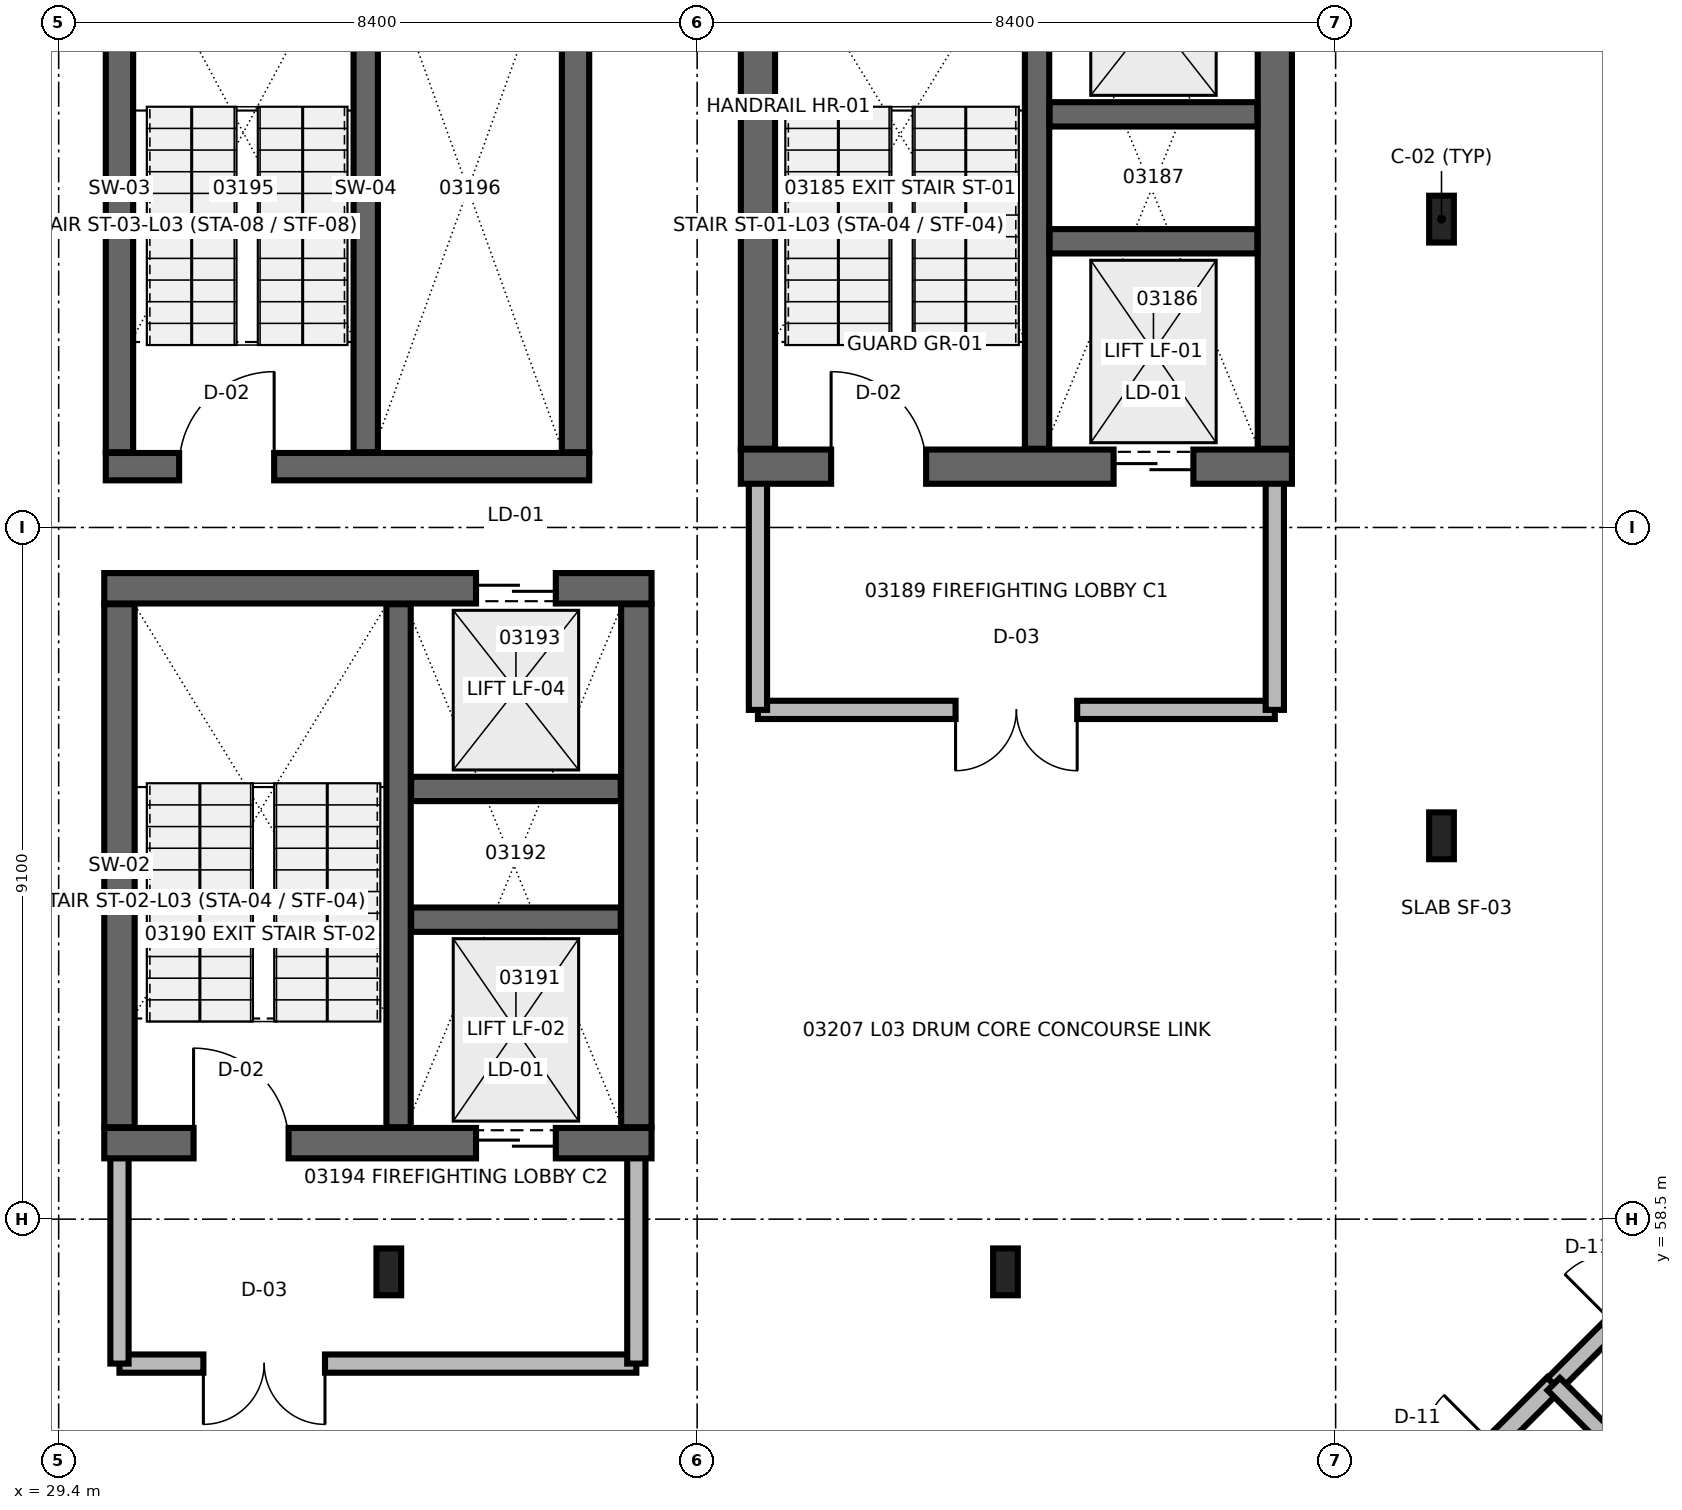
"""IFC4 building model, lengths in metres.
Left out: names, types, materials, properties, quantities, classifications, styles, units other than length and angle.
Written with IfcOpenShell. Run it as: python <this file> out.ifc"""

import sys

from ifc_helpers import new_model, si_unit, direction, frame, frame_2d, origin, origin_2d, place, context, subcontext, project, spatial, rectangle, i_section, extrude, element, fill, save


model = new_model("IFC4")
c1 = context("Model", 3, precision=1e-05, world=origin(), true_north=direction((0.0, 1.0)))
c2 = subcontext(c1, "Body", "Model", "MODEL_VIEW")
j1 = project(units=[si_unit("LENGTHUNIT", "METRE"), si_unit("PLANEANGLEUNIT", "RADIAN")], contexts=[c1])
p1 = place(None, origin())
s1 = spatial("IfcSite", under=j1, at=p1, CompositionType="ELEMENT")
p2 = place(p1, origin())
s2 = spatial("IfcBuilding", under=s1, at=p2, CompositionType="ELEMENT")
p3 = place(p2, frame((0.0, 0.0, 13.8)))
s3 = spatial("IfcBuildingStorey", under=s2, at=p3, CompositionType="ELEMENT", Elevation=13.8)
for number, where, z_axis, x_axis in (
    (1, (47.593, 71.656, 0.0), (0.0, 0.0, 1.0), (1.0, 0.0, 0.0)),
    (2, (33.744, 57.807, 0.0), (0.0, 0.0, 1.0), (1.0, 0.0, 0.0)),
    (3, (41.856, 57.807, 0.0), (0.0, 0.0, 1.0), (1.0, 0.0, 0.0)),
    (4, (47.593, 63.544, 0.0), (0.0, 0.0, 1.0), (1.0, 0.0, 0.0)),
):
    element("IfcColumn", number, at=place(p3, frame(where, z_axis=z_axis, x_axis=x_axis)), inside=s3, PredefinedType="COLUMN", context=c2, shape_type="SweptSolid", body=[
        extrude(i_section(OverallWidth=0.325, OverallDepth=0.616, WebThickness=0.014, FlangeThickness=0.021, at=origin_2d()), origin(), (0.0, 0.0, 1.0), 3.9),
    ])
p4 = place(p3, frame((49.238, 49.504, 0.0), z_axis=(0.0, 0.0, 1.0), x_axis=(0.707106781187, 0.707106781187, 0.0)))
e5 = element("IfcWall", 5, at=p4, inside=s3, PredefinedType="SOLIDWALL", context=c2, shape_type="SweptSolid", body=[
    extrude(rectangle(XDim=8.836, YDim=0.26, at=frame_2d((4.418, 0.0))), origin(), (0.0, 0.0, 1.0), 1.48),
])
p5 = place(p3, frame((38.6, 65.2, 0.0), z_axis=(0.0, 0.0, 1.0), x_axis=(1.0, 0.0, 0.0)))
e6 = element("IfcWall", 6, at=p5, inside=s3, PredefinedType="SOLIDWALL", context=c2, shape_type="SweptSolid", body=[
    extrude(rectangle(XDim=6.8, YDim=0.24, at=frame_2d((3.4, 0.0))), origin(), (0.0, 0.0, 1.0), 3.64),
])
p6 = place(p5, frame((2.6, 0.0, 0.0)))
e7 = element("IfcOpeningElement", 7, at=p6, cuts=e6, PredefinedType="OPENING", context=c2, shape_type="SweptSolid", body=[
    extrude(rectangle(XDim=1.6, YDim=2.2, at=frame_2d((0.8, 1.1))), frame((0.0, 0.13, 0.0), z_axis=(0.0, -1.0, 0.0), x_axis=(1.0, 0.0, 0.0)), (0.0, 0.0, 1.0), 0.26),
])
for number, where, z_axis, x_axis in (
    (8, (38.6, 68.4, 0.0), (0.0, 0.0, 1.0), (0.0, -1.0, 0.0)),
    (9, (45.4, 65.2, 0.0), (0.0, 0.0, 1.0), (0.0, 1.0, 0.0)),
):
    element("IfcWall", number, at=place(p3, frame(where, z_axis=z_axis, x_axis=x_axis)), inside=s3, PredefinedType="SOLIDWALL", context=c2, shape_type="SweptSolid", body=[
        extrude(rectangle(XDim=3.2, YDim=0.24, at=frame_2d((1.6, 0.0))), origin(), (0.0, 0.0, 1.0), 3.64),
    ])
p7 = place(p3, frame((38.375, 68.4, 0.0), z_axis=(0.0, 0.0, 1.0), x_axis=(1.0, 0.0, 0.0)))
e10 = element("IfcWall", 10, at=p7, inside=s3, PredefinedType="SHEAR", context=c2, shape_type="SweptSolid", body=[
    extrude(rectangle(XDim=7.25, YDim=0.45, at=frame_2d((3.625, 0.0))), origin(), (0.0, 0.0, 1.0), 3.62),
])
p8 = place(p7, frame((1.188, 0.0, 0.0)))
e11 = element("IfcOpeningElement", 11, at=p8, cuts=e10, PredefinedType="OPENING", context=c2, shape_type="SweptSolid", body=[
    extrude(rectangle(XDim=1.25, YDim=2.2, at=frame_2d((0.625, 1.1))), frame((0.0, 0.235, 0.0), z_axis=(0.0, -1.0, 0.0), x_axis=(1.0, 0.0, 0.0)), (0.0, 0.0, 1.0), 0.47),
])
p9 = place(p7, frame((4.904, 0.0, 0.0)))
e12 = element("IfcOpeningElement", 12, at=p9, cuts=e10, PredefinedType="OPENING", context=c2, shape_type="SweptSolid", body=[
    extrude(rectangle(XDim=1.05, YDim=2.15, at=frame_2d((0.525, 1.075))), frame((0.0, 0.235, 0.0), z_axis=(0.0, -1.0, 0.0), x_axis=(1.0, 0.0, 0.0)), (0.0, 0.0, 1.0), 0.47),
])
for number, where, z_axis, x_axis in (
    (13, (38.6, 68.635, 0.0), (0.0, 0.0, 1.0), (0.0, 1.0, 0.0)),
    (14, (45.4, 68.635, 0.0), (0.0, 0.0, 1.0), (0.0, 1.0, 0.0)),
):
    element("IfcWall", number, at=place(p3, frame(where, z_axis=z_axis, x_axis=x_axis)), inside=s3, PredefinedType="SHEAR", context=c2, shape_type="SweptSolid", body=[
        extrude(rectangle(XDim=6.83, YDim=0.45, at=frame_2d((3.415, 0.0))), origin(), (0.0, 0.0, 1.0), 3.62),
    ])
p10 = place(p3, frame((42.272, 68.635, 0.0), z_axis=(0.0, 0.0, 1.0), x_axis=(0.0, 1.0, 0.0)))
e15 = element("IfcWall", 15, at=p10, inside=s3, PredefinedType="SHEAR", context=c2, shape_type="SweptSolid", body=[
    extrude(rectangle(XDim=6.83, YDim=0.32, at=frame_2d((3.415, 0.0))), origin(), (0.0, 0.0, 1.0), 3.62),
])
for number, where, z_axis, x_axis in (
    (16, (42.437, 71.365, 0.0), (0.0, 0.0, 1.0), (1.0, 0.0, 0.0)),
    (17, (42.437, 73.035, 0.0), (0.0, 0.0, 1.0), (1.0, 0.0, 0.0)),
):
    element("IfcWall", number, at=place(p3, frame(where, z_axis=z_axis, x_axis=x_axis)), inside=s3, PredefinedType="SHEAR", context=c2, shape_type="SweptSolid", body=[
        extrude(rectangle(XDim=2.733, YDim=0.32, at=frame_2d((1.366, 0.0))), origin(), (0.0, 0.0, 1.0), 3.62),
    ])
p11 = place(p3, frame((30.2, 56.6, 0.0), z_axis=(0.0, 0.0, 1.0), x_axis=(1.0, 0.0, 0.0)))
e18 = element("IfcWall", 18, at=p11, inside=s3, PredefinedType="SOLIDWALL", context=c2, shape_type="SweptSolid", body=[
    extrude(rectangle(XDim=6.8, YDim=0.24, at=frame_2d((3.4, 0.0))), origin(), (0.0, 0.0, 1.0), 3.004),
])
p12 = place(p11, frame((1.104, 0.0, 0.0)))
e19 = element("IfcOpeningElement", 19, at=p12, cuts=e18, PredefinedType="OPENING", context=c2, shape_type="SweptSolid", body=[
    extrude(rectangle(XDim=1.6, YDim=2.2, at=frame_2d((0.8, 1.1))), frame((0.0, 0.13, 0.0), z_axis=(0.0, -1.0, 0.0), x_axis=(1.0, 0.0, 0.0)), (0.0, 0.0, 1.0), 0.26),
])
p13 = place(p3, frame((30.2, 59.5, 0.0), z_axis=(0.0, 0.0, 1.0), x_axis=(0.0, -1.0, 0.0)))
e20 = element("IfcWall", 20, at=p13, inside=s3, PredefinedType="SOLIDWALL", context=c2, shape_type="SweptSolid", body=[
    extrude(rectangle(XDim=2.9, YDim=0.24, at=frame_2d((1.45, 0.0))), origin(), (0.0, 0.0, 1.0), 3.64),
])
p14 = place(p3, frame((37.0, 56.6, 0.0), z_axis=(0.0, 0.0, 1.0), x_axis=(0.0, 1.0, 0.0)))
e21 = element("IfcWall", 21, at=p14, inside=s3, PredefinedType="SOLIDWALL", context=c2, shape_type="SweptSolid", body=[
    extrude(rectangle(XDim=2.9, YDim=0.24, at=frame_2d((1.45, 0.0))), origin(), (0.0, 0.0, 1.0), 3.004),
])
p15 = place(p3, frame((30.0, 59.5, 0.0), z_axis=(0.0, 0.0, 1.0), x_axis=(1.0, 0.0, 0.0)))
e22 = element("IfcWall", 22, at=p15, inside=s3, PredefinedType="SHEAR", context=c2, shape_type="SweptSolid", body=[
    extrude(rectangle(XDim=7.2, YDim=0.4, at=frame_2d((3.6, 0.0))), origin(), (0.0, 0.0, 1.0), 3.62),
])
p16 = place(p15, frame((1.175, 0.0, 0.0)))
e23 = element("IfcOpeningElement", 23, at=p16, cuts=e22, PredefinedType="OPENING", context=c2, shape_type="SweptSolid", body=[
    extrude(rectangle(XDim=1.25, YDim=2.2, at=frame_2d((0.625, 1.1))), frame((0.0, 0.21, 0.0), z_axis=(0.0, -1.0, 0.0), x_axis=(1.0, 0.0, 0.0)), (0.0, 0.0, 1.0), 0.42),
])
p17 = place(p15, frame((4.891, 0.0, 0.0)))
e24 = element("IfcOpeningElement", 24, at=p17, cuts=e22, PredefinedType="OPENING", context=c2, shape_type="SweptSolid", body=[
    extrude(rectangle(XDim=1.05, YDim=2.15, at=frame_2d((0.525, 1.075))), frame((0.0, 0.21, 0.0), z_axis=(0.0, -1.0, 0.0), x_axis=(1.0, 0.0, 0.0)), (0.0, 0.0, 1.0), 0.42),
])
p18 = place(p3, frame((30.0, 66.8, 0.0), z_axis=(0.0, 0.0, 1.0), x_axis=(1.0, 0.0, 0.0)))
e25 = element("IfcWall", 25, at=p18, inside=s3, PredefinedType="SHEAR", context=c2, shape_type="SweptSolid", body=[
    extrude(rectangle(XDim=7.2, YDim=0.4, at=frame_2d((3.6, 0.0))), origin(), (0.0, 0.0, 1.0), 3.62),
])
p19 = place(p18, frame((4.891, 0.0, 0.0)))
e26 = element("IfcOpeningElement", 26, at=p19, cuts=e25, PredefinedType="OPENING", context=c2, shape_type="SweptSolid", body=[
    extrude(rectangle(XDim=1.05, YDim=2.15, at=frame_2d((0.525, 1.075))), frame((0.0, 0.21, 0.0), z_axis=(0.0, -1.0, 0.0), x_axis=(1.0, 0.0, 0.0)), (0.0, 0.0, 1.0), 0.42),
])
for number, where, z_axis, x_axis in (
    (27, (30.2, 59.71, 0.0), (0.0, 0.0, 1.0), (0.0, 1.0, 0.0)),
    (28, (37.0, 59.71, 0.0), (0.0, 0.0, 1.0), (0.0, 1.0, 0.0)),
):
    element("IfcWall", number, at=place(p3, frame(where, z_axis=z_axis, x_axis=x_axis)), inside=s3, PredefinedType="SHEAR", context=c2, shape_type="SweptSolid", body=[
        extrude(rectangle(XDim=6.88, YDim=0.4, at=frame_2d((3.44, 0.0))), origin(), (0.0, 0.0, 1.0), 3.62),
    ])
p20 = place(p3, frame((33.872, 59.71, 0.0), z_axis=(0.0, 0.0, 1.0), x_axis=(0.0, 1.0, 0.0)))
e29 = element("IfcWall", 29, at=p20, inside=s3, PredefinedType="SHEAR", context=c2, shape_type="SweptSolid", body=[
    extrude(rectangle(XDim=6.88, YDim=0.32, at=frame_2d((3.44, 0.0))), origin(), (0.0, 0.0, 1.0), 3.62),
])
for number, where, z_axis, x_axis in (
    (30, (34.037, 62.44, 0.0), (0.0, 0.0, 1.0), (1.0, 0.0, 0.0)),
    (31, (34.037, 64.16, 0.0), (0.0, 0.0, 1.0), (1.0, 0.0, 0.0)),
):
    element("IfcWall", number, at=place(p3, frame(where, z_axis=z_axis, x_axis=x_axis)), inside=s3, PredefinedType="SHEAR", context=c2, shape_type="SweptSolid", body=[
        extrude(rectangle(XDim=2.758, YDim=0.32, at=frame_2d((1.379, 0.0))), origin(), (0.0, 0.0, 1.0), 3.62),
    ])
p21 = place(p3, frame((30.02, 68.4, 0.0), z_axis=(0.0, 0.0, 1.0), x_axis=(1.0, 0.0, 0.0)))
e32 = element("IfcWall", 32, at=p21, inside=s3, PredefinedType="SHEAR", context=c2, shape_type="SweptSolid", body=[
    extrude(rectangle(XDim=6.36, YDim=0.36, at=frame_2d((3.18, 0.0))), origin(), (0.0, 0.0, 1.0), 3.62),
])
p22 = place(p21, frame((0.965, 0.0, 0.0)))
e33 = element("IfcOpeningElement", 33, at=p22, cuts=e32, PredefinedType="OPENING", context=c2, shape_type="SweptSolid", body=[
    extrude(rectangle(XDim=1.25, YDim=2.2, at=frame_2d((0.625, 1.1))), frame((0.0, 0.19, 0.0), z_axis=(0.0, -1.0, 0.0), x_axis=(1.0, 0.0, 0.0)), (0.0, 0.0, 1.0), 0.38),
])
for number, where, z_axis, x_axis in (
    (34, (30.2, 68.59, 0.0), (0.0, 0.0, 1.0), (0.0, 1.0, 0.0)),
    (35, (36.2, 68.59, 0.0), (0.0, 0.0, 1.0), (0.0, 1.0, 0.0)),
):
    element("IfcWall", number, at=place(p3, frame(where, z_axis=z_axis, x_axis=x_axis)), inside=s3, PredefinedType="SHEAR", context=c2, shape_type="SweptSolid", body=[
        extrude(rectangle(XDim=6.92, YDim=0.36, at=frame_2d((3.46, 0.0))), origin(), (0.0, 0.0, 1.0), 3.62),
    ])
p23 = place(p3, frame((33.44, 68.59, 0.0), z_axis=(0.0, 0.0, 1.0), x_axis=(0.0, 1.0, 0.0)))
e36 = element("IfcWall", 36, at=p23, inside=s3, PredefinedType="SHEAR", context=c2, shape_type="SweptSolid", body=[
    extrude(rectangle(XDim=6.92, YDim=0.32, at=frame_2d((3.46, 0.0))), origin(), (0.0, 0.0, 1.0), 3.62),
])
p24 = place(p3, frame((46.828, 54.089, 0.0), z_axis=(0.0, 0.0, 1.0), x_axis=(0.707106781187, 0.707106781187, 0.0)))
e37 = element("IfcWall", 37, at=p24, inside=s3, PredefinedType="PLUMBINGWALL", context=c2, shape_type="SweptSolid", body=[
    extrude(rectangle(XDim=3.17, YDim=0.25, at=frame_2d((1.585, 0.0))), origin(), (0.0, 0.0, 1.0), 3.004),
])
p25 = place(p24, frame((1.125, 0.0, 0.0)))
e38 = element("IfcOpeningElement", 38, at=p25, cuts=e37, PredefinedType="OPENING", context=c2, shape_type="SweptSolid", body=[
    extrude(rectangle(XDim=0.92, YDim=2.1, at=frame_2d((0.46, 1.05))), frame((0.0, 0.135, 0.0), z_axis=(0.0, -1.0, 0.0), x_axis=(1.0, 0.0, 0.0)), (0.0, 0.0, 1.0), 0.27),
])
p26 = place(p3, frame((49.07, 56.33, 0.0), z_axis=(0.0, 0.0, 1.0), x_axis=(0.707106781187, 0.707106781187, 0.0)))
e39 = element("IfcWall", 39, at=p26, inside=s3, PredefinedType="PLUMBINGWALL", context=c2, shape_type="SweptSolid", body=[
    extrude(rectangle(XDim=3.17, YDim=0.23, at=frame_2d((1.585, 0.0))), origin(), (0.0, 0.0, 1.0), 3.64),
])
p27 = place(p26, frame((1.125, 0.0, 0.0)))
e40 = element("IfcOpeningElement", 40, at=p27, cuts=e39, PredefinedType="OPENING", context=c2, shape_type="SweptSolid", body=[
    extrude(rectangle(XDim=0.92, YDim=2.1, at=frame_2d((0.46, 1.05))), frame((0.0, 0.125, 0.0), z_axis=(0.0, -1.0, 0.0), x_axis=(1.0, 0.0, 0.0)), (0.0, 0.0, 1.0), 0.25),
])
p28 = place(p3, frame((48.05, 52.26, 0.0), z_axis=(0.0, 0.0, 1.0), x_axis=(0.707123738387, 0.707089823579, 0.0)))
e41 = element("IfcWall", 41, at=p28, inside=s3, PredefinedType="PLUMBINGWALL", context=c2, shape_type="SweptSolid", body=[
    extrude(rectangle(XDim=7.199, YDim=0.25, at=frame_2d((3.599, 0.0))), origin(), (0.0, 0.0, 1.0), 3.144),
])
p29 = place(p3, frame((49.07, 56.33, 0.0), z_axis=(0.0, 0.0, 1.0), x_axis=(0.707106781187, -0.707106781187, 0.0)))
e42 = element("IfcWall", 42, at=p29, inside=s3, PredefinedType="PLUMBINGWALL", context=c2, shape_type="SweptSolid", body=[
    extrude(rectangle(XDim=2.158, YDim=0.23, at=frame_2d((1.079, 0.0))), origin(), (0.0, 0.0, 1.0), 3.144),
])
p30 = place(p6, frame((1.6, 0.0, 0.0), z_axis=(0.0, 0.0, 1.0), x_axis=(-1.0, 0.0, 0.0)))
e43 = element("IfcDoor", 43, at=p30, inside=s3, OperationType="DOUBLE_DOOR_SINGLE_SWING", PredefinedType="DOOR", context=c2, shape_type="SweptSolid", body=[
    extrude(rectangle(XDim=1.6, YDim=2.2, at=frame_2d((0.8, 1.1))), frame((0.0, 0.025, 0.0), z_axis=(0.0, -1.0, 0.0), x_axis=(1.0, 0.0, 0.0)), (0.0, 0.0, 1.0), 0.05),
])
fill(e7, e43)
p31 = place(p8, frame((1.25, 0.0, 0.0), z_axis=(0.0, 0.0, 1.0), x_axis=(-1.0, 0.0, 0.0)))
e44 = element("IfcDoor", 44, at=p31, inside=s3, OperationType="SINGLE_SWING_RIGHT", PredefinedType="DOOR", context=c2, shape_type="SweptSolid", body=[
    extrude(rectangle(XDim=1.25, YDim=2.2, at=frame_2d((0.625, 1.1))), frame((0.0, 0.025, 0.0), z_axis=(0.0, -1.0, 0.0), x_axis=(1.0, 0.0, 0.0)), (0.0, 0.0, 1.0), 0.05),
])
fill(e11, e44)
p32 = place(p9, frame((1.05, 0.0, 0.0), z_axis=(0.0, 0.0, 1.0), x_axis=(-1.0, 0.0, 0.0)))
e45 = element("IfcDoor", 45, at=p32, inside=s3, OperationType="DOUBLE_DOOR_SLIDING", PredefinedType="DOOR", context=c2, shape_type="SweptSolid", body=[
    extrude(rectangle(XDim=1.05, YDim=2.15, at=frame_2d((0.525, 1.075))), frame((0.0, 0.025, 0.0), z_axis=(0.0, -1.0, 0.0), x_axis=(1.0, 0.0, 0.0)), (0.0, 0.0, 1.0), 0.05),
])
fill(e12, e45)
p33 = place(p12, frame((1.6, 0.0, 0.0), z_axis=(0.0, 0.0, 1.0), x_axis=(-1.0, 0.0, 0.0)))
e46 = element("IfcDoor", 46, at=p33, inside=s3, OperationType="DOUBLE_DOOR_SINGLE_SWING", PredefinedType="DOOR", context=c2, shape_type="SweptSolid", body=[
    extrude(rectangle(XDim=1.6, YDim=2.2, at=frame_2d((0.8, 1.1))), frame((0.0, 0.025, 0.0), z_axis=(0.0, -1.0, 0.0), x_axis=(1.0, 0.0, 0.0)), (0.0, 0.0, 1.0), 0.05),
])
fill(e19, e46)
p34 = place(p16, frame((1.25, 0.0, 0.0), z_axis=(0.0, 0.0, 1.0), x_axis=(-1.0, 0.0, 0.0)))
e47 = element("IfcDoor", 47, at=p34, inside=s3, OperationType="SINGLE_SWING_RIGHT", PredefinedType="DOOR", context=c2, shape_type="SweptSolid", body=[
    extrude(rectangle(XDim=1.25, YDim=2.2, at=frame_2d((0.625, 1.1))), frame((0.0, 0.025, 0.0), z_axis=(0.0, -1.0, 0.0), x_axis=(1.0, 0.0, 0.0)), (0.0, 0.0, 1.0), 0.05),
])
fill(e23, e47)
p35 = place(p17, frame((1.05, 0.0, 0.0), z_axis=(0.0, 0.0, 1.0), x_axis=(-1.0, 0.0, 0.0)))
e48 = element("IfcDoor", 48, at=p35, inside=s3, OperationType="DOUBLE_DOOR_SLIDING", PredefinedType="DOOR", context=c2, shape_type="SweptSolid", body=[
    extrude(rectangle(XDim=1.05, YDim=2.15, at=frame_2d((0.525, 1.075))), frame((0.0, 0.025, 0.0), z_axis=(0.0, -1.0, 0.0), x_axis=(1.0, 0.0, 0.0)), (0.0, 0.0, 1.0), 0.05),
])
fill(e24, e48)
p36 = place(p19, origin())
e49 = element("IfcDoor", 49, at=p36, inside=s3, OperationType="DOUBLE_DOOR_SLIDING", PredefinedType="DOOR", context=c2, shape_type="SweptSolid", body=[
    extrude(rectangle(XDim=1.05, YDim=2.15, at=frame_2d((0.525, 1.075))), frame((0.0, 0.025, 0.0), z_axis=(0.0, -1.0, 0.0), x_axis=(1.0, 0.0, 0.0)), (0.0, 0.0, 1.0), 0.05),
])
fill(e26, e49)
p37 = place(p22, frame((1.25, 0.0, 0.0), z_axis=(0.0, 0.0, 1.0), x_axis=(-1.0, 0.0, 0.0)))
e50 = element("IfcDoor", 50, at=p37, inside=s3, OperationType="SINGLE_SWING_LEFT", PredefinedType="DOOR", context=c2, shape_type="SweptSolid", body=[
    extrude(rectangle(XDim=1.25, YDim=2.2, at=frame_2d((0.625, 1.1))), frame((0.0, 0.025, 0.0), z_axis=(0.0, -1.0, 0.0), x_axis=(1.0, 0.0, 0.0)), (0.0, 0.0, 1.0), 0.05),
])
fill(e33, e50)
save(model, sys.argv[1])
